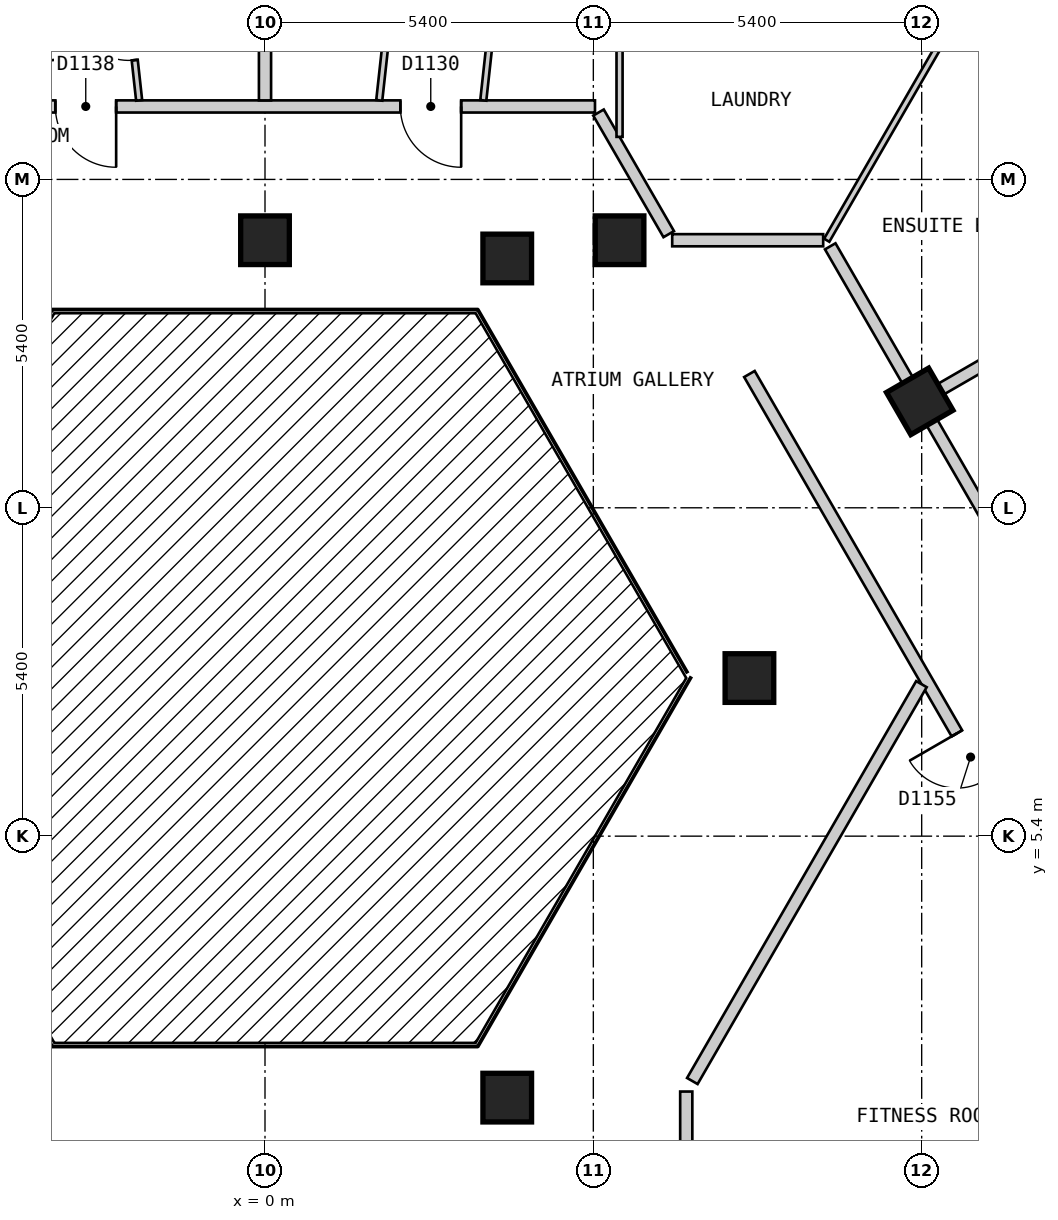
"""IFC4 building model, lengths in metres.
Left out: names, types, materials, properties, quantities, classifications, styles, units other than length and angle.
Written with IfcOpenShell. Run it as: python <this file> out.ifc"""

import sys

from ifc_helpers import new_model, si_unit, direction, frame, frame_2d, origin, origin_2d, place, context, subcontext, project, spatial, rectangle, extrude, element, fill, save


model = new_model("IFC4")
c1 = context("Model", 3, precision=1e-05, world=origin(), true_north=direction((0.0, 1.0)))
c2 = subcontext(c1, "Body", "Model", "MODEL_VIEW")
j1 = project(units=[si_unit("LENGTHUNIT", "METRE"), si_unit("PLANEANGLEUNIT", "RADIAN")], contexts=[c1])
p1 = place(None, origin())
s1 = spatial("IfcSite", under=j1, at=p1, CompositionType="ELEMENT")
p2 = place(p1, origin())
s2 = spatial("IfcBuilding", under=s1, at=p2, CompositionType="ELEMENT")
p3 = place(p2, frame((0.0, 0.0, 150.6)))
s3 = spatial("IfcBuildingStorey", under=s2, at=p3, CompositionType="ELEMENT", Elevation=150.6)
for number, where, z_axis, x_axis in (
    (1, (3.984, 1.1, 0.0), (0.0, 0.0, 1.0), (1.0, 0.0, 0.0)),
    (2, (7.967, 8.0, 0.0), (0.0, 0.0, 1.0), (1.0, 0.0, 0.0)),
    (3, (10.768, 12.55, 0.0), (0.0, 0.0, 1.0), (-0.5, 0.866, 0.0)),
    (4, (5.831, 15.2, 0.0), (0.0, 0.0, 1.0), (-1.0, 0.0, 0.0)),
    (5, (3.984, 14.9, 0.0), (0.0, 0.0, 1.0), (1.0, 0.0, 0.0)),
    (6, (0.0, 15.2, 0.0), (0.0, 0.0, 1.0), (-1.0, 0.0, 0.0)),
):
    element("IfcColumn", number, at=place(p3, frame(where, z_axis=z_axis, x_axis=x_axis)), inside=s3, PredefinedType="COLUMN", context=c2, shape_type="SweptSolid", body=[
        extrude(rectangle(XDim=0.8, YDim=0.8, at=origin_2d()), origin(), (0.0, 0.0, 1.0), 3.0),
    ])
p4 = place(p3, frame((5.485, 17.3, 0.0), z_axis=(0.0, 0.0, 1.0), x_axis=(0.500027479704, -0.866009537788, 0.0)))
e7 = element("IfcWall", 7, at=p4, inside=s3, PredefinedType="PARTITIONING", context=c2, shape_type="SweptSolid", body=[
    extrude(rectangle(XDim=2.309, YDim=0.2, at=frame_2d((1.155, 0.0))), origin(), (0.0, 0.0, 1.0), 2.6),
])
p5 = place(p3, frame((7.967, 13.0, 0.0), z_axis=(0.0, 0.0, 1.0), x_axis=(0.50003774998, -0.866003607726, 0.0)))
e8 = element("IfcWall", 8, at=p5, inside=s3, PredefinedType="PARTITIONING", context=c2, shape_type="SweptSolid", body=[
    extrude(rectangle(XDim=14.433, YDim=0.2, at=frame_2d((7.217, 0.0))), origin(), (0.0, 0.0, 1.0), 2.6),
])
p6 = place(p5, frame((6.824, 0.0, 0.0)))
e9 = element("IfcOpeningElement", 9, at=p6, cuts=e8, PredefinedType="OPENING", context=c2, shape_type="SweptSolid", body=[
    extrude(rectangle(XDim=0.9, YDim=2.1, at=frame_2d((0.45, 1.05))), frame((0.0, 0.11, 0.0), z_axis=(0.0, -1.0, 0.0), x_axis=(1.0, 0.0, 0.0)), (0.0, 0.0, 1.0), 0.22),
])
p7 = place(p3, frame((9.296, 15.1, 0.0), z_axis=(0.0, 0.0, 1.0), x_axis=(0.499974024244, -0.866040400375, 0.0)))
e10 = element("IfcWall", 10, at=p7, inside=s3, PredefinedType="PARTITIONING", context=c2, shape_type="SweptSolid", body=[
    extrude(rectangle(XDim=16.857, YDim=0.2, at=frame_2d((8.429, 0.0))), origin(), (0.0, 0.0, 1.0), 2.6),
])
p8 = place(p7, frame((11.522, 0.0, 0.0)))
e11 = element("IfcOpeningElement", 11, at=p8, cuts=e10, PredefinedType="OPENING", context=c2, shape_type="SweptSolid", body=[
    extrude(rectangle(XDim=1.0, YDim=2.1, at=frame_2d((0.5, 1.05))), frame((0.0, 0.11, 0.0), z_axis=(0.0, -1.0, 0.0), x_axis=(1.0, 0.0, 0.0)), (0.0, 0.0, 1.0), 0.22),
])
p9 = place(p3, frame((6.697, 15.2, 0.0), z_axis=(0.0, 0.0, 1.0), x_axis=(1.0, 0.0, 0.0)))
e12 = element("IfcWall", 12, at=p9, inside=s3, PredefinedType="PARTITIONING", context=c2, shape_type="SweptSolid", body=[
    extrude(rectangle(XDim=2.483, YDim=0.2, at=frame_2d((1.241, 0.0))), origin(), (0.0, 0.0, 1.0), 2.6),
])
p10 = place(p3, frame((-5.312, 17.4, 0.0), z_axis=(0.0, 0.0, 1.0), x_axis=(1.0, 0.0, 0.0)))
e13 = element("IfcWall", 13, at=p10, inside=s3, PredefinedType="PARTITIONING", context=c2, shape_type="SweptSolid", body=[
    extrude(rectangle(XDim=10.739, YDim=0.2, at=frame_2d((5.37, 0.0))), origin(), (0.0, 0.0, 1.0), 2.6),
])
p11 = place(p10, frame((7.538, 0.0, 0.0)))
e14 = element("IfcOpeningElement", 14, at=p11, cuts=e13, PredefinedType="OPENING", context=c2, shape_type="SweptSolid", body=[
    extrude(rectangle(XDim=1.0, YDim=2.1, at=frame_2d((0.5, 1.05))), frame((0.0, 0.11, 0.0), z_axis=(0.0, -1.0, 0.0), x_axis=(1.0, 0.0, 0.0)), (0.0, 0.0, 1.0), 0.22),
])
p12 = place(p10, frame((1.864, 0.0, 0.0)))
e15 = element("IfcOpeningElement", 15, at=p12, cuts=e13, PredefinedType="OPENING", context=c2, shape_type="SweptSolid", body=[
    extrude(rectangle(XDim=1.0, YDim=2.1, at=frame_2d((0.5, 1.05))), frame((0.0, 0.11, 0.0), z_axis=(0.0, -1.0, 0.0), x_axis=(1.0, 0.0, 0.0)), (0.0, 0.0, 1.0), 0.22),
])
p13 = place(p3, frame((7.028, 1.373, 0.0), z_axis=(0.0, 0.0, 1.0), x_axis=(0.499954271211, 0.866051803703, 0.0)))
e16 = element("IfcWall", 16, at=p13, inside=s3, PredefinedType="PARTITIONING", context=c2, shape_type="SweptSolid", body=[
    extrude(rectangle(XDim=7.536, YDim=0.2, at=frame_2d((3.768, 0.0))), origin(), (0.0, 0.0, 1.0), 2.6),
])
p14 = place(p3, frame((6.928, -2.8, 0.0), z_axis=(0.0, 0.0, 1.0), x_axis=(0.0, 1.0, 0.0)))
e17 = element("IfcWall", 17, at=p14, inside=s3, PredefinedType="PARTITIONING", context=c2, shape_type="SweptSolid", body=[
    extrude(rectangle(XDim=4.0, YDim=0.2, at=frame_2d((2.0, 0.0))), origin(), (0.0, 0.0, 1.0), 2.6),
])
p15 = place(p3, frame((11.713, 19.313, 0.0), z_axis=(0.0, 0.0, 1.0), x_axis=(0.499945064984, -0.866057118208, 0.0)))
e18 = element("IfcWall", 18, at=p15, inside=s3, PredefinedType="PARTITIONING", context=c2, shape_type="SweptSolid", body=[
    extrude(rectangle(XDim=5.285, YDim=0.1, at=frame_2d((2.642, 0.0))), origin(), (0.0, 0.0, 1.0), 2.6),
])
p16 = place(p15, frame((2.242, 0.0, 0.0)))
e19 = element("IfcOpeningElement", 19, at=p16, cuts=e18, PredefinedType="OPENING", context=c2, shape_type="SweptSolid", body=[
    extrude(rectangle(XDim=0.8, YDim=2.1, at=frame_2d((0.4, 1.05))), frame((0.0, 0.06, 0.0), z_axis=(0.0, -1.0, 0.0), x_axis=(1.0, 0.0, 0.0)), (0.0, 0.0, 1.0), 0.12),
])
p17 = place(p3, frame((-2.319, 19.77, 0.0), z_axis=(0.0, 0.0, 1.0), x_axis=(0.109046821538, -0.994036614372, 0.0)))
e20 = element("IfcWall", 20, at=p17, inside=s3, PredefinedType="PARTITIONING", context=c2, shape_type="SweptSolid", body=[
    extrude(rectangle(XDim=2.284, YDim=0.1, at=frame_2d((1.142, 0.0))), origin(), (0.0, 0.0, 1.0), 2.6),
])
p18 = place(p17, frame((0.717, 0.0, 0.0)))
e21 = element("IfcOpeningElement", 21, at=p18, cuts=e20, PredefinedType="OPENING", context=c2, shape_type="SweptSolid", body=[
    extrude(rectangle(XDim=0.9, YDim=2.1, at=frame_2d((0.45, 1.05))), frame((0.0, 0.06, 0.0), z_axis=(0.0, -1.0, 0.0), x_axis=(1.0, 0.0, 0.0)), (0.0, 0.0, 1.0), 0.12),
])
p19 = place(p3, frame((9.238, 15.2, 0.0), z_axis=(0.0, 0.0, 1.0), x_axis=(0.499988022762, 0.866032318735, 0.0)))
e22 = element("IfcWall", 22, at=p19, inside=s3, PredefinedType="PARTITIONING", context=c2, shape_type="SweptSolid", body=[
    extrude(rectangle(XDim=4.748, YDim=0.1, at=frame_2d((2.374, 0.0))), origin(), (0.0, 0.0, 1.0), 2.6),
])
p20 = place(p3, frame((3.59, 17.5, 0.0), z_axis=(0.0, 0.0, 1.0), x_axis=(0.108938463119, 0.994048495423, 0.0)))
e23 = element("IfcWall", 23, at=p20, inside=s3, PredefinedType="PARTITIONING", context=c2, shape_type="SweptSolid", body=[
    extrude(rectangle(XDim=4.074, YDim=0.1, at=frame_2d((2.037, 0.0))), origin(), (0.0, 0.0, 1.0), 2.6),
])
p21 = place(p20, frame((1.612, 0.0, 0.0)))
e24 = element("IfcOpeningElement", 24, at=p21, cuts=e23, PredefinedType="OPENING", context=c2, shape_type="SweptSolid", body=[
    extrude(rectangle(XDim=0.8, YDim=2.1, at=frame_2d((0.4, 1.05))), frame((0.0, 0.06, 0.0), z_axis=(0.0, -1.0, 0.0), x_axis=(1.0, 0.0, 0.0)), (0.0, 0.0, 1.0), 0.12),
])
p22 = place(p3, frame((1.879, 17.5, 0.0), z_axis=(0.0, 0.0, 1.0), x_axis=(0.10923450369, 0.994016007519, 0.0)))
e25 = element("IfcWall", 25, at=p22, inside=s3, PredefinedType="PARTITIONING", context=c2, shape_type="SweptSolid", body=[
    extrude(rectangle(XDim=4.074, YDim=0.1, at=frame_2d((2.037, 0.0))), origin(), (0.0, 0.0, 1.0), 2.6),
])
p23 = place(p22, frame((1.562, 0.0, 0.0)))
e26 = element("IfcOpeningElement", 26, at=p23, cuts=e25, PredefinedType="OPENING", context=c2, shape_type="SweptSolid", body=[
    extrude(rectangle(XDim=0.9, YDim=2.1, at=frame_2d((0.45, 1.05))), frame((0.0, 0.06, 0.0), z_axis=(0.0, -1.0, 0.0), x_axis=(1.0, 0.0, 0.0)), (0.0, 0.0, 1.0), 0.12),
])
p24 = place(p3, frame((5.831, 16.9, 0.0), z_axis=(0.0, 0.0, 1.0), x_axis=(0.0, 1.0, 0.0)))
e27 = element("IfcWall", 27, at=p24, inside=s3, PredefinedType="PARTITIONING", context=c2, shape_type="SweptSolid", body=[
    extrude(rectangle(XDim=4.65, YDim=0.1, at=frame_2d((2.325, 0.0))), origin(), (0.0, 0.0, 1.0), 2.6),
])
p25 = place(p3, frame((0.0, 17.5, 0.0), z_axis=(0.0, 0.0, 1.0), x_axis=(0.0, 1.0, 0.0)))
e28 = element("IfcWall", 28, at=p25, inside=s3, PredefinedType="PARTITIONING", context=c2, shape_type="SweptSolid", body=[
    extrude(rectangle(XDim=7.8, YDim=0.2, at=frame_2d((3.9, 0.0))), origin(), (0.0, 0.0, 1.0), 2.6),
])
p26 = place(p3, frame((10.854, 12.6, 0.0), z_axis=(0.0, 0.0, 1.0), x_axis=(0.866031112038, 0.499990112884, 0.0)))
e29 = element("IfcWall", 29, at=p26, inside=s3, PredefinedType="PARTITIONING", context=c2, shape_type="SweptSolid", body=[
    extrude(rectangle(XDim=3.948, YDim=0.2, at=frame_2d((1.974, 0.0))), origin(), (0.0, 0.0, 1.0), 2.6),
])
p27 = place(p11, origin())
e30 = element("IfcDoor", 30, at=p27, inside=s3, OperationType="SINGLE_SWING_RIGHT", PredefinedType="DOOR", context=c2, shape_type="SweptSolid", body=[
    extrude(rectangle(XDim=1.0, YDim=2.1, at=frame_2d((0.5, 1.05))), frame((0.0, 0.025, 0.0), z_axis=(0.0, -1.0, 0.0), x_axis=(1.0, 0.0, 0.0)), (0.0, 0.0, 1.0), 0.05),
])
fill(e14, e30)
p28 = place(p12, origin())
e31 = element("IfcDoor", 31, at=p28, inside=s3, OperationType="SINGLE_SWING_RIGHT", PredefinedType="DOOR", context=c2, shape_type="SweptSolid", body=[
    extrude(rectangle(XDim=1.0, YDim=2.1, at=frame_2d((0.5, 1.05))), frame((0.0, 0.025, 0.0), z_axis=(0.0, -1.0, 0.0), x_axis=(1.0, 0.0, 0.0)), (0.0, 0.0, 1.0), 0.05),
])
fill(e15, e31)
p29 = place(p18, origin())
e32 = element("IfcDoor", 32, at=p29, inside=s3, OperationType="SINGLE_SWING_LEFT", PredefinedType="DOOR", context=c2, shape_type="SweptSolid", body=[
    extrude(rectangle(XDim=0.9, YDim=2.1, at=frame_2d((0.45, 1.05))), frame((0.0, 0.025, 0.0), z_axis=(0.0, -1.0, 0.0), x_axis=(1.0, 0.0, 0.0)), (0.0, 0.0, 1.0), 0.05),
])
fill(e21, e32)
p30 = place(p6, origin())
e33 = element("IfcDoor", 33, at=p30, inside=s3, OperationType="SINGLE_SWING_LEFT", PredefinedType="DOOR", context=c2, shape_type="SweptSolid", body=[
    extrude(rectangle(XDim=0.9, YDim=2.1, at=frame_2d((0.45, 1.05))), frame((0.0, 0.025, 0.0), z_axis=(0.0, -1.0, 0.0), x_axis=(1.0, 0.0, 0.0)), (0.0, 0.0, 1.0), 0.05),
])
fill(e9, e33)
save(model, sys.argv[1])
